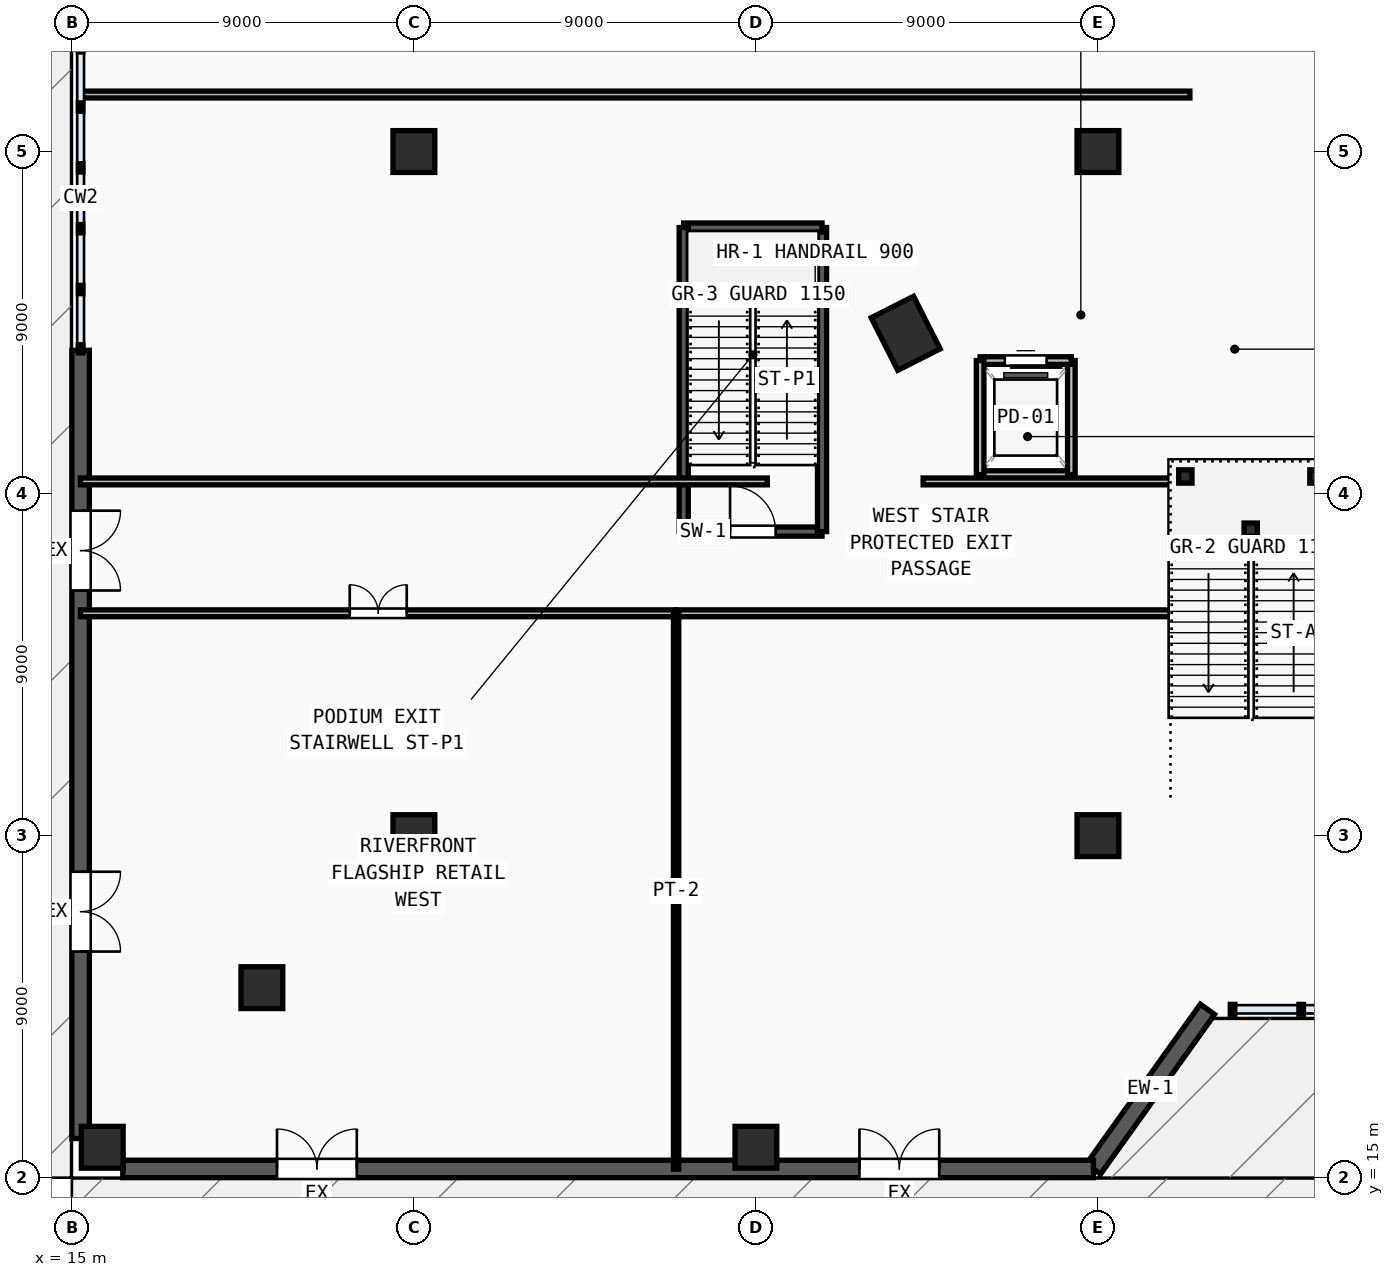
"""IFC4 building model, lengths in metres.
Left out: names, types, materials, properties, quantities, classifications, styles, units other than length and angle.
Written with IfcOpenShell. Run it as: python <this file> out.ifc"""

import sys

from ifc_helpers import new_model, si_unit, direction, frame, frame_2d, origin, origin_2d, place, context, subcontext, project, spatial, rectangle, i_section, extrude, source, transform, mapped, element, fill, save


model = new_model("IFC4")
c1 = context("Model", 3, precision=1e-05, world=origin(), true_north=direction((0.0, 1.0)))
c2 = subcontext(c1, "Body", "Model", "MODEL_VIEW")
j1 = project(units=[si_unit("LENGTHUNIT", "METRE"), si_unit("PLANEANGLEUNIT", "RADIAN")], contexts=[c1])
p1 = place(None, origin())
s1 = spatial("IfcSite", under=j1, at=p1, CompositionType="ELEMENT")
p2 = place(p1, origin())
s2 = spatial("IfcBuilding", under=s1, at=p2, CompositionType="ELEMENT")
p3 = place(p2, origin())
s3 = spatial("IfcBuildingStorey", under=s2, at=p3, CompositionType="ELEMENT", Elevation=0.0)
m1 = source(origin(), c2, "Body", "SweptSolid", [
    extrude(rectangle(XDim=1.55, YDim=1.25, at=origin_2d()), origin(), (0.0, 0.0, 1.0), 5.4),
])
p4 = place(p3, frame((36.941, 37.217, 0.0), z_axis=(0.0, 0.0, 1.0), x_axis=(-0.451500573218, 0.892270829056, 0.0)))
e1 = element("IfcColumn", 1, at=p4, inside=s3, PredefinedType="COLUMN", context=c2, shape_type="MappedRepresentation", body=[
    mapped(m1, transform((0.0, 0.0, 0.0), x_axis=(1.0, 0.0, 0.0), y_axis=(0.0, 1.0, 0.0), z_axis=(0.0, 0.0, 1.0), scale=1.0)),
])
m2 = source(origin(), c2, "Body", "SweptSolid", [
    extrude(rectangle(XDim=1.1, YDim=1.1, at=origin_2d()), origin(), (0.0, 0.0, 1.0), 5.4),
])
for number, where, z_axis, x_axis in (
    (2, (24.0, 24.0, 0.0), (0.0, 0.0, 1.0), (1.0, 0.0, 0.0)),
    (3, (42.0, 24.0, 0.0), (0.0, 0.0, 1.0), (1.0, 0.0, 0.0)),
    (4, (24.0, 42.0, 0.0), (0.0, 0.0, 1.0), (1.0, 0.0, 0.0)),
    (5, (42.0, 42.0, 0.0), (0.0, 0.0, 1.0), (1.0, 0.0, 0.0)),
    (6, (15.8, 15.8, 0.0), (0.0, 0.0, 1.0), (1.0, 0.0, 0.0)),
    (7, (33.0, 15.8, 0.0), (0.0, 0.0, 1.0), (1.0, 0.0, 0.0)),
    (8, (20.0, 20.0, 0.0), (0.0, 0.0, 1.0), (1.0, 0.0, 0.0)),
):
    element("IfcColumn", number, at=place(p3, frame(where, z_axis=z_axis, x_axis=x_axis)), inside=s3, PredefinedType="COLUMN", context=c2, shape_type="MappedRepresentation", body=[
        mapped(m2, transform((0.0, 0.0, 0.0), x_axis=(1.0, 0.0, 0.0), y_axis=(0.0, 1.0, 0.0), z_axis=(0.0, 0.0, 1.0), scale=1.0)),
    ])
m3 = source(origin(), c2, "Body", "SweptSolid", [
    extrude(i_section(OverallWidth=0.35, OverallDepth=0.35, WebThickness=0.012, FlangeThickness=0.019, at=origin_2d()), origin(), (0.0, 0.0, 1.0), 5.4),
])
for number, where, z_axis, x_axis in (
    (9, (44.3, 33.45, 0.0), (0.0, 0.0, 1.0), (1.0, 0.0, 0.0)),
    (10, (47.75, 33.45, 0.0), (0.0, 0.0, 1.0), (1.0, 0.0, 0.0)),
    (11, (46.02, 32.05, 0.0), (0.0, 0.0, 1.0), (1.0, 0.0, 0.0)),
):
    element("IfcColumn", number, at=place(p3, frame(where, z_axis=z_axis, x_axis=x_axis)), inside=s3, PredefinedType="COLUMN", context=c2, shape_type="MappedRepresentation", body=[
        mapped(m3, transform((0.0, 0.0, 0.0), x_axis=(1.0, 0.0, 0.0), y_axis=(0.0, 1.0, 0.0), z_axis=(0.0, 0.0, 1.0), scale=1.0)),
    ])
p5 = place(p3, frame((41.882, 15.23, 0.0), z_axis=(0.0, 0.0, 1.0), x_axis=(0.581242668191, 0.813730275137, 0.0)))
e12 = element("IfcWall", 12, at=p5, inside=s3, PredefinedType="SOLIDWALL", context=c2, shape_type="SweptSolid", body=[
    extrude(rectangle(XDim=5.161, YDim=0.46, at=frame_2d((2.581, 0.0))), origin(), (0.0, 0.0, 1.0), 5.15),
])
p6 = place(p3, frame((15.23, 36.77, 0.0), z_axis=(0.0, 0.0, 1.0), x_axis=(0.0, -1.0, 0.0)))
e13 = element("IfcWall", 13, at=p6, inside=s3, PredefinedType="SOLIDWALL", context=c2, shape_type="SweptSolid", body=[
    extrude(rectangle(XDim=20.74, YDim=0.46, at=frame_2d((10.37, 0.0))), origin(), (0.0, 0.0, 1.0), 5.15),
])
m4 = source(origin(), c2, "Body", "SweptSolid", [
    extrude(rectangle(XDim=2.1, YDim=2.4, at=frame_2d((1.05, 1.2))), frame((0.0, 0.24, 0.0), z_axis=(0.0, -1.0, 0.0), x_axis=(1.0, 0.0, 0.0)), (0.0, 0.0, 1.0), 0.48),
])
p7 = place(p6, frame((13.72, 0.0, 0.0)))
e14 = element("IfcOpeningElement", 14, at=p7, cuts=e13, PredefinedType="OPENING", context=c2, shape_type="MappedRepresentation", body=[
    mapped(m4, transform((0.0, 0.0, 0.0), x_axis=(1.0, 0.0, 0.0), y_axis=(0.0, 1.0, 0.0), z_axis=(0.0, 0.0, 1.0), scale=1.0)),
])
p8 = place(p6, frame((4.22, 0.0, 0.0)))
e15 = element("IfcOpeningElement", 15, at=p8, cuts=e13, PredefinedType="OPENING", context=c2, shape_type="MappedRepresentation", body=[
    mapped(m4, transform((0.0, 0.0, 0.0), x_axis=(1.0, 0.0, 0.0), y_axis=(0.0, 1.0, 0.0), z_axis=(0.0, 0.0, 1.0), scale=1.0)),
])
p9 = place(p3, frame((16.34, 15.23, 0.0), z_axis=(0.0, 0.0, 1.0), x_axis=(1.0, 0.0, 0.0)))
e16 = element("IfcWall", 16, at=p9, inside=s3, PredefinedType="SOLIDWALL", context=c2, shape_type="SweptSolid", body=[
    extrude(rectangle(XDim=25.542, YDim=0.46, at=frame_2d((12.771, 0.0))), origin(), (0.0, 0.0, 1.0), 5.15),
])
p10 = place(p9, frame((4.058, 0.0, 0.0)))
e17 = element("IfcOpeningElement", 17, at=p10, cuts=e16, PredefinedType="OPENING", context=c2, shape_type="MappedRepresentation", body=[
    mapped(m4, transform((0.0, 0.0, 0.0), x_axis=(1.0, 0.0, 0.0), y_axis=(0.0, 1.0, 0.0), z_axis=(0.0, 0.0, 1.0), scale=1.0)),
])
p11 = place(p9, frame((19.384, 0.0, 0.0)))
e18 = element("IfcOpeningElement", 18, at=p11, cuts=e16, PredefinedType="OPENING", context=c2, shape_type="MappedRepresentation", body=[
    mapped(m4, transform((0.0, 0.0, 0.0), x_axis=(1.0, 0.0, 0.0), y_axis=(0.0, 1.0, 0.0), z_axis=(0.0, 0.0, 1.0), scale=1.0)),
])
p12 = place(p3, frame((31.1, 32.0, 0.0), z_axis=(0.0, 0.0, 1.0), x_axis=(1.0, 0.0, 0.0)))
e19 = element("IfcWall", 19, at=p12, inside=s3, PredefinedType="SOLIDWALL", context=c2, shape_type="SweptSolid", body=[
    extrude(rectangle(XDim=3.64, YDim=0.24, at=frame_2d((1.82, 0.0))), origin(), (0.0, 0.0, 1.0), 5.15),
])
m5 = source(origin(), c2, "Body", "SweptSolid", [
    extrude(rectangle(XDim=1.2, YDim=2.2, at=frame_2d((0.6, 1.1))), frame((0.0, 0.13, 0.0), z_axis=(0.0, -1.0, 0.0), x_axis=(1.0, 0.0, 0.0)), (0.0, 0.0, 1.0), 0.26),
])
p13 = place(p12, frame((1.22, 0.0, 0.0)))
e20 = element("IfcOpeningElement", 20, at=p13, cuts=e19, PredefinedType="OPENING", context=c2, shape_type="MappedRepresentation", body=[
    mapped(m5, transform((0.0, 0.0, 0.0), x_axis=(1.0, 0.0, 0.0), y_axis=(0.0, 1.0, 0.0), z_axis=(0.0, 0.0, 1.0), scale=1.0)),
])
p14 = place(p3, frame((34.74, 32.0, 0.0), z_axis=(0.0, 0.0, 1.0), x_axis=(0.0, 1.0, 0.0)))
e21 = element("IfcWall", 21, at=p14, inside=s3, PredefinedType="SOLIDWALL", context=c2, shape_type="SweptSolid", body=[
    extrude(rectangle(XDim=8.0, YDim=0.24, at=frame_2d((4.0, 0.0))), origin(), (0.0, 0.0, 1.0), 5.15),
])
p15 = place(p3, frame((34.74, 40.0, 0.0), z_axis=(0.0, 0.0, 1.0), x_axis=(-1.0, 0.0, 0.0)))
e22 = element("IfcWall", 22, at=p15, inside=s3, PredefinedType="SOLIDWALL", context=c2, shape_type="SweptSolid", body=[
    extrude(rectangle(XDim=3.64, YDim=0.24, at=frame_2d((1.82, 0.0))), origin(), (0.0, 0.0, 1.0), 5.15),
])
p16 = place(p3, frame((31.1, 40.0, 0.0), z_axis=(0.0, 0.0, 1.0), x_axis=(0.0, -1.0, 0.0)))
e23 = element("IfcWall", 23, at=p16, inside=s3, PredefinedType="SOLIDWALL", context=c2, shape_type="SweptSolid", body=[
    extrude(rectangle(XDim=8.0, YDim=0.24, at=frame_2d((4.0, 0.0))), origin(), (0.0, 0.0, 1.0), 5.15),
])
p17 = place(p3, frame((38.9, 33.5, 0.0), z_axis=(0.0, 0.0, 1.0), x_axis=(1.0, 0.0, 0.0)))
e24 = element("IfcWall", 24, at=p17, inside=s3, PredefinedType="SOLIDWALL", context=c2, shape_type="SweptSolid", body=[
    extrude(rectangle(XDim=2.4, YDim=0.2, at=frame_2d((1.2, 0.0))), origin(), (0.0, 0.0, 1.0), 5.15),
])
p18 = place(p3, frame((41.3, 33.5, 0.0), z_axis=(0.0, 0.0, 1.0), x_axis=(0.0, 1.0, 0.0)))
e25 = element("IfcWall", 25, at=p18, inside=s3, PredefinedType="SOLIDWALL", context=c2, shape_type="SweptSolid", body=[
    extrude(rectangle(XDim=3.0, YDim=0.2, at=frame_2d((1.5, 0.0))), origin(), (0.0, 0.0, 1.0), 5.15),
])
p19 = place(p3, frame((41.3, 36.5, 0.0), z_axis=(0.0, 0.0, 1.0), x_axis=(-1.0, 0.0, 0.0)))
e26 = element("IfcWall", 26, at=p19, inside=s3, PredefinedType="SOLIDWALL", context=c2, shape_type="SweptSolid", body=[
    extrude(rectangle(XDim=2.4, YDim=0.2, at=frame_2d((1.2, 0.0))), origin(), (0.0, 0.0, 1.0), 5.15),
])
m6 = source(origin(), c2, "Body", "SweptSolid", [
    extrude(rectangle(XDim=1.1, YDim=2.2, at=frame_2d((0.55, 1.1))), frame((0.0, 0.11, 0.0), z_axis=(0.0, -1.0, 0.0), x_axis=(1.0, 0.0, 0.0)), (0.0, 0.0, 1.0), 0.22),
])
p20 = place(p19, frame((0.65, 0.0, 0.0)))
e27 = element("IfcOpeningElement", 27, at=p20, cuts=e26, PredefinedType="OPENING", context=c2, shape_type="MappedRepresentation", body=[
    mapped(m6, transform((0.0, 0.0, 0.0), x_axis=(1.0, 0.0, 0.0), y_axis=(0.0, 1.0, 0.0), z_axis=(0.0, 0.0, 1.0), scale=1.0)),
])
p21 = place(p3, frame((38.9, 36.5, 0.0), z_axis=(0.0, 0.0, 1.0), x_axis=(0.0, -1.0, 0.0)))
e28 = element("IfcWall", 28, at=p21, inside=s3, PredefinedType="SOLIDWALL", context=c2, shape_type="SweptSolid", body=[
    extrude(rectangle(XDim=3.0, YDim=0.2, at=frame_2d((1.5, 0.0))), origin(), (0.0, 0.0, 1.0), 5.15),
])
p22 = place(p3, frame((15.225, 29.85, 0.0), z_axis=(0.0, 0.0, 1.0), x_axis=(1.0, 0.0, 0.0)))
e29 = element("IfcWall", 29, at=p22, inside=s3, PredefinedType="PARTITIONING", context=c2, shape_type="SweptSolid", body=[
    extrude(rectangle(XDim=15.675, YDim=0.18, at=frame_2d((7.837, 0.0))), origin(), (0.0, 0.0, 1.0), 5.15),
])
m7 = source(origin(), c2, "Body", "SweptSolid", [
    extrude(rectangle(XDim=1.5, YDim=2.2, at=frame_2d((0.75, 1.1))), frame((0.0, 0.1, 0.0), z_axis=(0.0, -1.0, 0.0), x_axis=(1.0, 0.0, 0.0)), (0.0, 0.0, 1.0), 0.2),
])
p23 = place(p22, frame((7.087, 0.0, 0.0)))
e30 = element("IfcOpeningElement", 30, at=p23, cuts=e29, PredefinedType="OPENING", context=c2, shape_type="MappedRepresentation", body=[
    mapped(m7, transform((0.0, 0.0, 0.0), x_axis=(1.0, 0.0, 0.0), y_axis=(0.0, 1.0, 0.0), z_axis=(0.0, 0.0, 1.0), scale=1.0)),
])
p24 = place(p3, frame((15.225, 43.5, 0.0), z_axis=(0.0, 0.0, 1.0), x_axis=(1.0, 0.0, 0.0)))
e31 = element("IfcWall", 31, at=p24, inside=s3, PredefinedType="PARTITIONING", context=c2, shape_type="SweptSolid", body=[
    extrude(rectangle(XDim=29.195, YDim=0.18, at=frame_2d((14.597, 0.0))), origin(), (0.0, 0.0, 1.0), 5.15),
])
p25 = place(p3, frame((30.9, 29.85, 0.0), z_axis=(0.0, 0.0, 1.0), x_axis=(1.0, 0.0, 0.0)))
e32 = element("IfcWall", 32, at=p25, inside=s3, PredefinedType="PARTITIONING", context=c2, shape_type="SweptSolid", body=[
    extrude(rectangle(XDim=13.52, YDim=0.18, at=frame_2d((6.76, 0.0))), origin(), (0.0, 0.0, 1.0), 5.15),
])
p26 = place(p3, frame((15.225, 33.32, 0.0), z_axis=(0.0, 0.0, 1.0), x_axis=(1.0, 0.0, 0.0)))
e33 = element("IfcWall", 33, at=p26, inside=s3, PredefinedType="PARTITIONING", context=c2, shape_type="SweptSolid", body=[
    extrude(rectangle(XDim=18.075, YDim=0.18, at=frame_2d((9.038, 0.0))), origin(), (0.0, 0.0, 1.0), 5.15),
])
p27 = place(p3, frame((37.4, 33.32, 0.0), z_axis=(0.0, 0.0, 1.0), x_axis=(1.0, 0.0, 0.0)))
e34 = element("IfcWall", 34, at=p27, inside=s3, PredefinedType="PARTITIONING", context=c2, shape_type="SweptSolid", body=[
    extrude(rectangle(XDim=7.02, YDim=0.18, at=frame_2d((3.51, 0.0))), origin(), (0.0, 0.0, 1.0), 5.15),
])
p28 = place(p3, frame((30.9, 15.225, 0.0), z_axis=(0.0, 0.0, 1.0), x_axis=(0.0, 1.0, 0.0)))
e35 = element("IfcWall", 35, at=p28, inside=s3, PredefinedType="PARTITIONING", context=c2, shape_type="SweptSolid", body=[
    extrude(rectangle(XDim=14.625, YDim=0.14, at=frame_2d((7.312, 0.0))), origin(), (0.0, 0.0, 1.0), 5.15),
])
m8 = source(origin(), c2, "Body", "SweptSolid", [
    extrude(rectangle(XDim=2.1, YDim=2.4, at=frame_2d((1.05, 1.2))), frame((0.0, 0.025, 0.0), z_axis=(0.0, -1.0, 0.0), x_axis=(1.0, 0.0, 0.0)), (0.0, 0.0, 1.0), 0.05),
])
p29 = place(p7, frame((2.1, 0.0, 0.0), z_axis=(0.0, 0.0, 1.0), x_axis=(-1.0, 0.0, 0.0)))
e36 = element("IfcDoor", 36, at=p29, inside=s3, OperationType="DOUBLE_DOOR_SINGLE_SWING", PredefinedType="DOOR", context=c2, shape_type="MappedRepresentation", body=[
    mapped(m8, transform((0.0, 0.0, 0.0), x_axis=(1.0, 0.0, 0.0), y_axis=(0.0, 1.0, 0.0), z_axis=(0.0, 0.0, 1.0), scale=1.0)),
])
fill(e14, e36)
p30 = place(p8, frame((2.1, 0.0, 0.0), z_axis=(0.0, 0.0, 1.0), x_axis=(-1.0, 0.0, 0.0)))
e37 = element("IfcDoor", 37, at=p30, inside=s3, OperationType="DOUBLE_DOOR_SINGLE_SWING", PredefinedType="DOOR", context=c2, shape_type="MappedRepresentation", body=[
    mapped(m8, transform((0.0, 0.0, 0.0), x_axis=(1.0, 0.0, 0.0), y_axis=(0.0, 1.0, 0.0), z_axis=(0.0, 0.0, 1.0), scale=1.0)),
])
fill(e15, e37)
p31 = place(p10, frame((2.1, 0.0, 0.0), z_axis=(0.0, 0.0, 1.0), x_axis=(-1.0, 0.0, 0.0)))
e38 = element("IfcDoor", 38, at=p31, inside=s3, OperationType="DOUBLE_DOOR_SINGLE_SWING", PredefinedType="DOOR", context=c2, shape_type="MappedRepresentation", body=[
    mapped(m8, transform((0.0, 0.0, 0.0), x_axis=(1.0, 0.0, 0.0), y_axis=(0.0, 1.0, 0.0), z_axis=(0.0, 0.0, 1.0), scale=1.0)),
])
fill(e17, e38)
p32 = place(p11, frame((2.1, 0.0, 0.0), z_axis=(0.0, 0.0, 1.0), x_axis=(-1.0, 0.0, 0.0)))
e39 = element("IfcDoor", 39, at=p32, inside=s3, OperationType="DOUBLE_DOOR_SINGLE_SWING", PredefinedType="DOOR", context=c2, shape_type="MappedRepresentation", body=[
    mapped(m8, transform((0.0, 0.0, 0.0), x_axis=(1.0, 0.0, 0.0), y_axis=(0.0, 1.0, 0.0), z_axis=(0.0, 0.0, 1.0), scale=1.0)),
])
fill(e18, e39)
m9 = source(origin(), c2, "Body", "SweptSolid", [
    extrude(rectangle(XDim=1.2, YDim=2.2, at=frame_2d((0.6, 1.1))), frame((0.0, 0.025, 0.0), z_axis=(0.0, -1.0, 0.0), x_axis=(1.0, 0.0, 0.0)), (0.0, 0.0, 1.0), 0.05),
])
p33 = place(p13, origin())
e40 = element("IfcDoor", 40, at=p33, inside=s3, OperationType="SINGLE_SWING_LEFT", PredefinedType="DOOR", context=c2, shape_type="MappedRepresentation", body=[
    mapped(m9, transform((0.0, 0.0, 0.0), x_axis=(1.0, 0.0, 0.0), y_axis=(0.0, 1.0, 0.0), z_axis=(0.0, 0.0, 1.0), scale=1.0)),
])
fill(e20, e40)
m10 = source(origin(), c2, "Body", "SweptSolid", [
    extrude(rectangle(XDim=1.1, YDim=2.2, at=frame_2d((0.55, 1.1))), frame((0.0, 0.025, 0.0), z_axis=(0.0, -1.0, 0.0), x_axis=(1.0, 0.0, 0.0)), (0.0, 0.0, 1.0), 0.05),
])
p34 = place(p20, origin())
e41 = element("IfcDoor", 41, at=p34, inside=s3, OperationType="SLIDING_TO_LEFT", PredefinedType="DOOR", context=c2, shape_type="MappedRepresentation", body=[
    mapped(m10, transform((0.0, 0.0, 0.0), x_axis=(1.0, 0.0, 0.0), y_axis=(0.0, 1.0, 0.0), z_axis=(0.0, 0.0, 1.0), scale=1.0)),
])
fill(e27, e41)
m11 = source(origin(), c2, "Body", "SweptSolid", [
    extrude(rectangle(XDim=1.5, YDim=2.2, at=frame_2d((0.75, 1.1))), frame((0.0, 0.025, 0.0), z_axis=(0.0, -1.0, 0.0), x_axis=(1.0, 0.0, 0.0)), (0.0, 0.0, 1.0), 0.05),
])
p35 = place(p23, origin())
e42 = element("IfcDoor", 42, at=p35, inside=s3, OperationType="DOUBLE_DOOR_SINGLE_SWING", PredefinedType="DOOR", context=c2, shape_type="MappedRepresentation", body=[
    mapped(m11, transform((0.0, 0.0, 0.0), x_axis=(1.0, 0.0, 0.0), y_axis=(0.0, 1.0, 0.0), z_axis=(0.0, 0.0, 1.0), scale=1.0)),
])
fill(e30, e42)
save(model, sys.argv[1])
